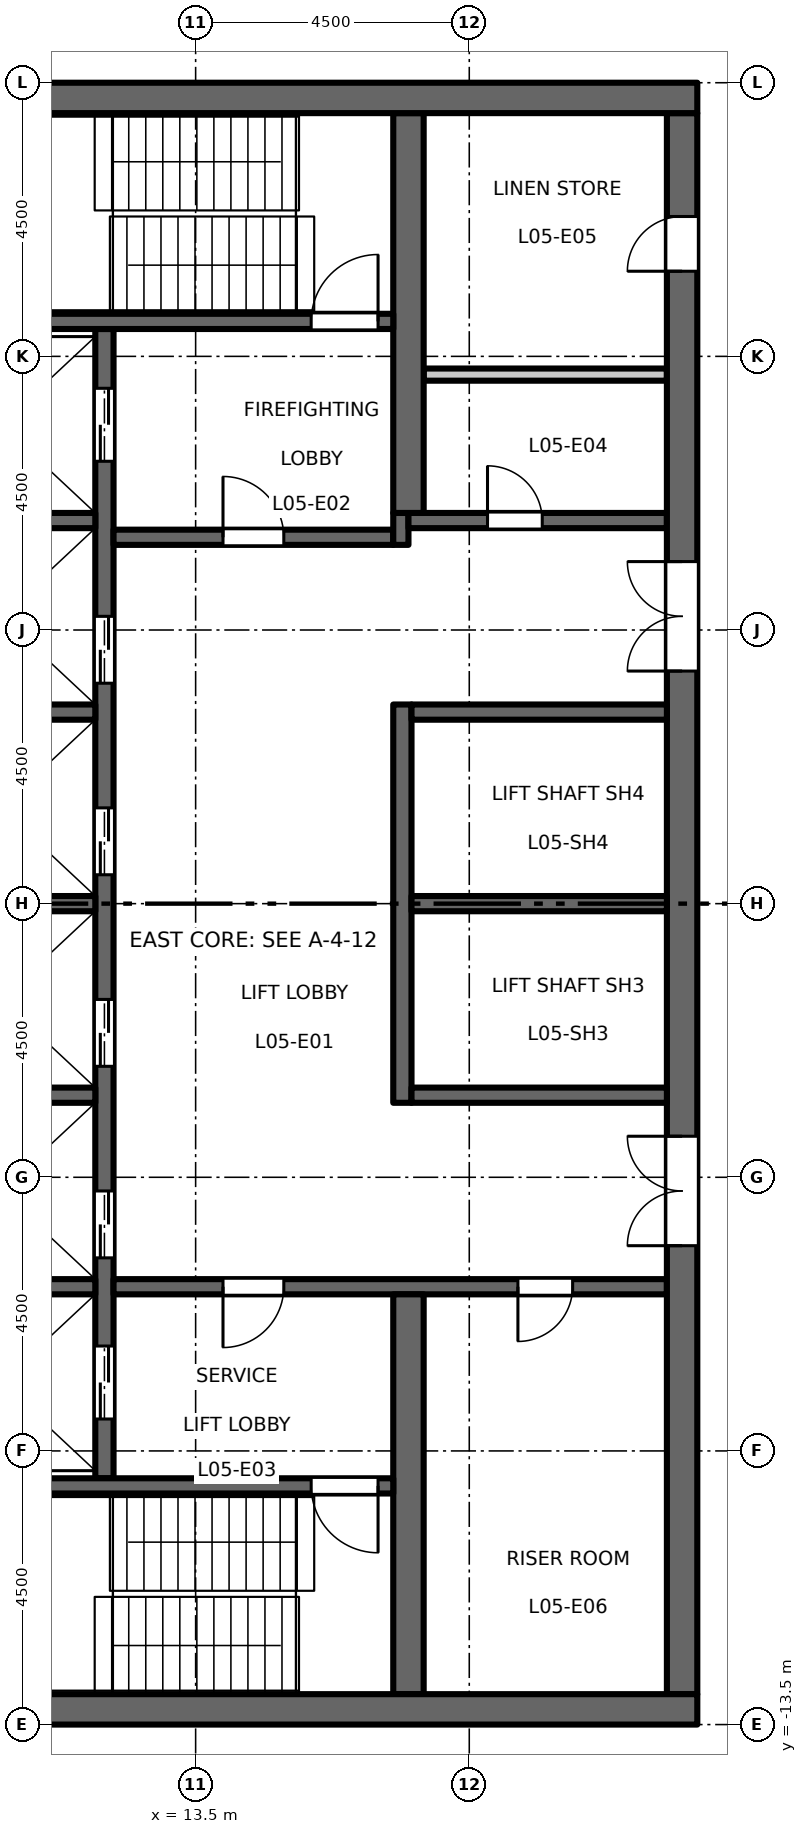
"""IFC4 building model, lengths in metres.
Left out: names, types, materials, properties, quantities, classifications, styles, units other than length and angle.
Written with IfcOpenShell. Run it as: python <this file> out.ifc"""

import sys

from ifc_helpers import new_model, si_unit, direction, frame, frame_2d, origin, place, context, subcontext, project, spatial, rectangle, extrude, element, fill, save


model = new_model("IFC4")
c1 = context("Model", 3, precision=1e-05, world=origin(), true_north=direction((0.0, 1.0)))
c2 = subcontext(c1, "Body", "Model", "MODEL_VIEW")
j1 = project(units=[si_unit("LENGTHUNIT", "METRE"), si_unit("PLANEANGLEUNIT", "RADIAN")], contexts=[c1])
p1 = place(None, origin())
s1 = spatial("IfcSite", under=j1, at=p1, CompositionType="ELEMENT")
p2 = place(p1, origin())
s2 = spatial("IfcBuilding", under=s1, at=p2, CompositionType="ELEMENT")
p3 = place(p2, frame((0.0, 0.0, 26.7)))
s3 = spatial("IfcBuildingStorey", under=s2, at=p3, CompositionType="ELEMENT", Elevation=26.7)
p4 = place(p3, frame((12.0, -9.45, 0.0), z_axis=(0.0, 0.0, 1.0), x_axis=(0.0, 1.0, 0.0)))
e1 = element("IfcWall", 1, at=p4, inside=s3, PredefinedType="SHEAR", context=c2, shape_type="SweptSolid", body=[
    extrude(rectangle(XDim=18.9, YDim=0.3, at=frame_2d((9.45, 0.0))), origin(), (0.0, 0.0, 1.0), 4.35),
])
p5 = place(p4, frame((3.625, 0.0, 0.0)))
e2 = element("IfcOpeningElement", 2, at=p5, cuts=e1, PredefinedType="OPENING", context=c2, shape_type="SweptSolid", body=[
    extrude(rectangle(XDim=1.1, YDim=2.1, at=frame_2d((0.55, 1.05))), frame((0.0, 0.16, 0.0), z_axis=(0.0, -1.0, 0.0), x_axis=(1.0, 0.0, 0.0)), (0.0, 0.0, 1.0), 0.32),
])
p6 = place(p4, frame((6.775, 0.0, 0.0)))
e3 = element("IfcOpeningElement", 3, at=p6, cuts=e1, PredefinedType="OPENING", context=c2, shape_type="SweptSolid", body=[
    extrude(rectangle(XDim=1.1, YDim=2.1, at=frame_2d((0.55, 1.05))), frame((0.0, 0.16, 0.0), z_axis=(0.0, -1.0, 0.0), x_axis=(1.0, 0.0, 0.0)), (0.0, 0.0, 1.0), 0.32),
])
p7 = place(p4, frame((9.925, 0.0, 0.0)))
e4 = element("IfcOpeningElement", 4, at=p7, cuts=e1, PredefinedType="OPENING", context=c2, shape_type="SweptSolid", body=[
    extrude(rectangle(XDim=1.1, YDim=2.1, at=frame_2d((0.55, 1.05))), frame((0.0, 0.16, 0.0), z_axis=(0.0, -1.0, 0.0), x_axis=(1.0, 0.0, 0.0)), (0.0, 0.0, 1.0), 0.32),
])
p8 = place(p4, frame((13.075, 0.0, 0.0)))
e5 = element("IfcOpeningElement", 5, at=p8, cuts=e1, PredefinedType="OPENING", context=c2, shape_type="SweptSolid", body=[
    extrude(rectangle(XDim=1.1, YDim=2.1, at=frame_2d((0.55, 1.05))), frame((0.0, 0.16, 0.0), z_axis=(0.0, -1.0, 0.0), x_axis=(1.0, 0.0, 0.0)), (0.0, 0.0, 1.0), 0.32),
])
p9 = place(p4, frame((16.725, 0.0, 0.0)))
e6 = element("IfcOpeningElement", 6, at=p9, cuts=e1, PredefinedType="OPENING", context=c2, shape_type="SweptSolid", body=[
    extrude(rectangle(XDim=1.2, YDim=2.1, at=frame_2d((0.6, 1.05))), frame((0.0, 0.16, 0.0), z_axis=(0.0, -1.0, 0.0), x_axis=(1.0, 0.0, 0.0)), (0.0, 0.0, 1.0), 0.32),
])
p10 = place(p4, frame((0.975, 0.0, 0.0)))
e7 = element("IfcOpeningElement", 7, at=p10, cuts=e1, PredefinedType="OPENING", context=c2, shape_type="SweptSolid", body=[
    extrude(rectangle(XDim=1.2, YDim=2.1, at=frame_2d((0.6, 1.05))), frame((0.0, 0.16, 0.0), z_axis=(0.0, -1.0, 0.0), x_axis=(1.0, 0.0, 0.0)), (0.0, 0.0, 1.0), 0.32),
])
p11 = place(p3, frame((12.15, 6.025, 0.0), z_axis=(0.0, 0.0, 1.0), x_axis=(1.0, 0.0, 0.0)))
e8 = element("IfcWall", 8, at=p11, inside=s3, PredefinedType="SHEAR", context=c2, shape_type="SweptSolid", body=[
    extrude(rectangle(XDim=4.6, YDim=0.25, at=frame_2d((2.3, 0.0))), origin(), (0.0, 0.0, 1.0), 4.35),
])
p12 = place(p11, frame((1.8, 0.0, 0.0)))
e9 = element("IfcOpeningElement", 9, at=p12, cuts=e8, PredefinedType="OPENING", context=c2, shape_type="SweptSolid", body=[
    extrude(rectangle(XDim=1.0, YDim=2.1, at=frame_2d((0.5, 1.05))), frame((0.0, 0.135, 0.0), z_axis=(0.0, -1.0, 0.0), x_axis=(1.0, 0.0, 0.0)), (0.0, 0.0, 1.0), 0.27),
])
p13 = place(p3, frame((16.875, 5.9, 0.0), z_axis=(0.0, 0.0, 1.0), x_axis=(0.0, 1.0, 0.0)))
e10 = element("IfcWall", 10, at=p13, inside=s3, PredefinedType="SHEAR", context=c2, shape_type="SweptSolid", body=[
    extrude(rectangle(XDim=0.525, YDim=0.25, at=frame_2d((0.263, 0.0))), origin(), (0.0, 0.0, 1.0), 4.35),
])
p14 = place(p3, frame((17.0, 6.3, 0.0), z_axis=(0.0, 0.0, 1.0), x_axis=(1.0, 0.0, 0.0)))
e11 = element("IfcWall", 11, at=p14, inside=s3, PredefinedType="SHEAR", context=c2, shape_type="SweptSolid", body=[
    extrude(rectangle(XDim=4.25, YDim=0.25, at=frame_2d((2.125, 0.0))), origin(), (0.0, 0.0, 1.0), 4.35),
])
p15 = place(p14, frame((1.3, 0.0, 0.0)))
e12 = element("IfcOpeningElement", 12, at=p15, cuts=e11, PredefinedType="OPENING", context=c2, shape_type="SweptSolid", body=[
    extrude(rectangle(XDim=0.9, YDim=2.1, at=frame_2d((0.45, 1.05))), frame((0.0, 0.135, 0.0), z_axis=(0.0, -1.0, 0.0), x_axis=(1.0, 0.0, 0.0)), (0.0, 0.0, 1.0), 0.27),
])
p16 = place(p3, frame((12.15, -6.3, 0.0), z_axis=(0.0, 0.0, 1.0), x_axis=(1.0, 0.0, 0.0)))
e13 = element("IfcWall", 13, at=p16, inside=s3, PredefinedType="SHEAR", context=c2, shape_type="SweptSolid", body=[
    extrude(rectangle(XDim=9.1, YDim=0.25, at=frame_2d((4.55, 0.0))), origin(), (0.0, 0.0, 1.0), 4.35),
])
p17 = place(p16, frame((1.8, 0.0, 0.0)))
e14 = element("IfcOpeningElement", 14, at=p17, cuts=e13, PredefinedType="OPENING", context=c2, shape_type="SweptSolid", body=[
    extrude(rectangle(XDim=1.0, YDim=2.1, at=frame_2d((0.5, 1.05))), frame((0.0, 0.135, 0.0), z_axis=(0.0, -1.0, 0.0), x_axis=(1.0, 0.0, 0.0)), (0.0, 0.0, 1.0), 0.27),
])
p18 = place(p16, frame((6.65, 0.0, 0.0)))
e15 = element("IfcOpeningElement", 15, at=p18, cuts=e13, PredefinedType="OPENING", context=c2, shape_type="SweptSolid", body=[
    extrude(rectangle(XDim=0.9, YDim=2.1, at=frame_2d((0.45, 1.05))), frame((0.0, 0.135, 0.0), z_axis=(0.0, -1.0, 0.0), x_axis=(1.0, 0.0, 0.0)), (0.0, 0.0, 1.0), 0.27),
])
p19 = place(p3, frame((21.5, -13.0, 0.0), z_axis=(0.0, 0.0, 1.0), x_axis=(0.0, 1.0, 0.0)))
e16 = element("IfcWall", 16, at=p19, inside=s3, PredefinedType="SHEAR", context=c2, shape_type="SweptSolid", body=[
    extrude(rectangle(XDim=26.0, YDim=0.5, at=frame_2d((13.0, 0.0))), origin(), (0.0, 0.0, 1.0), 4.35),
])
p20 = place(p19, frame((16.825, 0.0, 0.0)))
e17 = element("IfcOpeningElement", 17, at=p20, cuts=e16, PredefinedType="OPENING", context=c2, shape_type="SweptSolid", body=[
    extrude(rectangle(XDim=1.8, YDim=2.1, at=frame_2d((0.9, 1.05))), frame((0.0, 0.26, 0.0), z_axis=(0.0, -1.0, 0.0), x_axis=(1.0, 0.0, 0.0)), (0.0, 0.0, 1.0), 0.52),
])
p21 = place(p19, frame((7.375, 0.0, 0.0)))
e18 = element("IfcOpeningElement", 18, at=p21, cuts=e16, PredefinedType="OPENING", context=c2, shape_type="SweptSolid", body=[
    extrude(rectangle(XDim=1.8, YDim=2.1, at=frame_2d((0.9, 1.05))), frame((0.0, 0.26, 0.0), z_axis=(0.0, -1.0, 0.0), x_axis=(1.0, 0.0, 0.0)), (0.0, 0.0, 1.0), 0.52),
])
p22 = place(p19, frame((23.4, 0.0, 0.0)))
e19 = element("IfcOpeningElement", 19, at=p22, cuts=e16, PredefinedType="OPENING", context=c2, shape_type="SweptSolid", body=[
    extrude(rectangle(XDim=0.9, YDim=2.1, at=frame_2d((0.45, 1.05))), frame((0.0, 0.26, 0.0), z_axis=(0.0, -1.0, 0.0), x_axis=(1.0, 0.0, 0.0)), (0.0, 0.0, 1.0), 0.52),
])
p23 = place(p3, frame((17.25, 8.7, 0.0), z_axis=(0.0, 0.0, 1.0), x_axis=(1.0, 0.0, 0.0)))
e20 = element("IfcWall", 20, at=p23, inside=s3, PredefinedType="PARTITIONING", context=c2, shape_type="SweptSolid", body=[
    extrude(rectangle(XDim=4.0, YDim=0.2, at=frame_2d((2.0, 0.0))), origin(), (0.0, 0.0, 1.0), 4.35),
])
p24 = place(p3, frame((16.9, -3.275, 0.0), z_axis=(0.0, 0.0, 1.0), x_axis=(0.0, 1.0, 0.0)))
e21 = element("IfcWall", 21, at=p24, inside=s3, PredefinedType="SHEAR", context=c2, shape_type="SweptSolid", body=[
    extrude(rectangle(XDim=6.55, YDim=0.3, at=frame_2d((3.275, 0.0))), origin(), (0.0, 0.0, 1.0), 4.35),
])
for number, where, z_axis, x_axis in (
    (22, (17.05, 0.0, 0.0), (0.0, 0.0, 1.0), (1.0, 0.0, 0.0)),
    (23, (17.05, 3.15, 0.0), (0.0, 0.0, 1.0), (1.0, 0.0, 0.0)),
    (24, (17.05, -3.15, 0.0), (0.0, 0.0, 1.0), (1.0, 0.0, 0.0)),
):
    element("IfcWall", number, at=place(p3, frame(where, z_axis=z_axis, x_axis=x_axis)), inside=s3, PredefinedType="SHEAR", context=c2, shape_type="SweptSolid", body=[
        extrude(rectangle(XDim=4.2, YDim=0.25, at=frame_2d((2.1, 0.0))), origin(), (0.0, 0.0, 1.0), 4.35),
    ])
for number, where, z_axis, x_axis in (
    (25, (17.0, 6.425, 0.0), (0.0, 0.0, 1.0), (0.0, 1.0, 0.0)),
    (26, (17.0, -13.0, 0.0), (0.0, 0.0, 1.0), (0.0, 1.0, 0.0)),
):
    element("IfcWall", number, at=place(p3, frame(where, z_axis=z_axis, x_axis=x_axis)), inside=s3, PredefinedType="SHEAR", context=c2, shape_type="SweptSolid", body=[
        extrude(rectangle(XDim=6.575, YDim=0.5, at=frame_2d((3.288, 0.0))), origin(), (0.0, 0.0, 1.0), 4.35),
    ])
for number, where, z_axis, x_axis in (
    (27, (8.75, 0.0, 0.0), (0.0, 0.0, 1.0), (1.0, 0.0, 0.0)),
    (28, (8.75, 3.15, 0.0), (0.0, 0.0, 1.0), (1.0, 0.0, 0.0)),
    (29, (8.75, 6.3, 0.0), (0.0, 0.0, 1.0), (1.0, 0.0, 0.0)),
    (30, (8.75, -3.15, 0.0), (0.0, 0.0, 1.0), (1.0, 0.0, 0.0)),
    (31, (8.75, -6.3, 0.0), (0.0, 0.0, 1.0), (1.0, 0.0, 0.0)),
):
    element("IfcWall", number, at=place(p3, frame(where, z_axis=z_axis, x_axis=x_axis)), inside=s3, PredefinedType="SHEAR", context=c2, shape_type="SweptSolid", body=[
        extrude(rectangle(XDim=3.1, YDim=0.25, at=frame_2d((1.55, 0.0))), origin(), (0.0, 0.0, 1.0), 4.35),
    ])
p25 = place(p3, frame((8.75, 9.575, 0.0), z_axis=(0.0, 0.0, 1.0), x_axis=(1.0, 0.0, 0.0)))
e32 = element("IfcWall", 32, at=p25, inside=s3, PredefinedType="SHEAR", context=c2, shape_type="SweptSolid", body=[
    extrude(rectangle(XDim=8.0, YDim=0.25, at=frame_2d((4.0, 0.0))), origin(), (0.0, 0.0, 1.0), 4.35),
])
p26 = place(p25, frame((6.65, 0.0, 0.0)))
e33 = element("IfcOpeningElement", 33, at=p26, cuts=e32, PredefinedType="OPENING", context=c2, shape_type="SweptSolid", body=[
    extrude(rectangle(XDim=1.1, YDim=2.1, at=frame_2d((0.55, 1.05))), frame((0.0, 0.135, 0.0), z_axis=(0.0, -1.0, 0.0), x_axis=(1.0, 0.0, 0.0)), (0.0, 0.0, 1.0), 0.27),
])
p27 = place(p3, frame((8.75, -9.575, 0.0), z_axis=(0.0, 0.0, 1.0), x_axis=(1.0, 0.0, 0.0)))
e34 = element("IfcWall", 34, at=p27, inside=s3, PredefinedType="SHEAR", context=c2, shape_type="SweptSolid", body=[
    extrude(rectangle(XDim=8.0, YDim=0.25, at=frame_2d((4.0, 0.0))), origin(), (0.0, 0.0, 1.0), 4.35),
])
p28 = place(p27, frame((6.65, 0.0, 0.0)))
e35 = element("IfcOpeningElement", 35, at=p28, cuts=e34, PredefinedType="OPENING", context=c2, shape_type="SweptSolid", body=[
    extrude(rectangle(XDim=1.1, YDim=2.1, at=frame_2d((0.55, 1.05))), frame((0.0, 0.135, 0.0), z_axis=(0.0, -1.0, 0.0), x_axis=(1.0, 0.0, 0.0)), (0.0, 0.0, 1.0), 0.27),
])
for number, where, z_axis, x_axis in (
    (36, (8.25, 13.25, 0.0), (0.0, 0.0, 1.0), (1.0, 0.0, 0.0)),
    (37, (8.25, -13.25, 0.0), (0.0, 0.0, 1.0), (1.0, 0.0, 0.0)),
):
    element("IfcWall", number, at=place(p3, frame(where, z_axis=z_axis, x_axis=x_axis)), inside=s3, PredefinedType="SHEAR", context=c2, shape_type="SweptSolid", body=[
        extrude(rectangle(XDim=13.5, YDim=0.5, at=frame_2d((6.75, 0.0))), origin(), (0.0, 0.0, 1.0), 4.35),
    ])
p29 = place(p12, origin())
e38 = element("IfcDoor", 38, at=p29, inside=s3, OperationType="SINGLE_SWING_RIGHT", PredefinedType="DOOR", context=c2, shape_type="SweptSolid", body=[
    extrude(rectangle(XDim=1.0, YDim=2.1, at=frame_2d((0.5, 1.05))), frame((0.0, 0.025, 0.0), z_axis=(0.0, -1.0, 0.0), x_axis=(1.0, 0.0, 0.0)), (0.0, 0.0, 1.0), 0.05),
])
fill(e9, e38)
p30 = place(p17, origin())
e39 = element("IfcDoor", 39, at=p30, inside=s3, OperationType="SINGLE_SWING_LEFT", PredefinedType="DOOR", context=c2, shape_type="SweptSolid", body=[
    extrude(rectangle(XDim=1.0, YDim=2.1, at=frame_2d((0.5, 1.05))), frame((0.0, 0.025, 0.0), z_axis=(0.0, -1.0, 0.0), x_axis=(1.0, 0.0, 0.0)), (0.0, 0.0, 1.0), 0.05),
])
fill(e14, e39)
p31 = place(p26, origin())
e40 = element("IfcDoor", 40, at=p31, inside=s3, OperationType="SINGLE_SWING_LEFT", PredefinedType="DOOR", context=c2, shape_type="SweptSolid", body=[
    extrude(rectangle(XDim=1.1, YDim=2.1, at=frame_2d((0.55, 1.05))), frame((0.0, 0.025, 0.0), z_axis=(0.0, -1.0, 0.0), x_axis=(1.0, 0.0, 0.0)), (0.0, 0.0, 1.0), 0.05),
])
fill(e33, e40)
p32 = place(p28, origin())
e41 = element("IfcDoor", 41, at=p32, inside=s3, OperationType="SINGLE_SWING_RIGHT", PredefinedType="DOOR", context=c2, shape_type="SweptSolid", body=[
    extrude(rectangle(XDim=1.1, YDim=2.1, at=frame_2d((0.55, 1.05))), frame((0.0, 0.025, 0.0), z_axis=(0.0, -1.0, 0.0), x_axis=(1.0, 0.0, 0.0)), (0.0, 0.0, 1.0), 0.05),
])
fill(e35, e41)
p33 = place(p20, origin())
e42 = element("IfcDoor", 42, at=p33, inside=s3, OperationType="DOUBLE_DOOR_DOUBLE_SWING", PredefinedType="DOOR", context=c2, shape_type="SweptSolid", body=[
    extrude(rectangle(XDim=1.8, YDim=2.1, at=frame_2d((0.9, 1.05))), frame((0.0, 0.025, 0.0), z_axis=(0.0, -1.0, 0.0), x_axis=(1.0, 0.0, 0.0)), (0.0, 0.0, 1.0), 0.05),
])
fill(e17, e42)
p34 = place(p21, origin())
e43 = element("IfcDoor", 43, at=p34, inside=s3, OperationType="DOUBLE_DOOR_DOUBLE_SWING", PredefinedType="DOOR", context=c2, shape_type="SweptSolid", body=[
    extrude(rectangle(XDim=1.8, YDim=2.1, at=frame_2d((0.9, 1.05))), frame((0.0, 0.025, 0.0), z_axis=(0.0, -1.0, 0.0), x_axis=(1.0, 0.0, 0.0)), (0.0, 0.0, 1.0), 0.05),
])
fill(e18, e43)
p35 = place(p5, origin())
e44 = element("IfcDoor", 44, at=p35, inside=s3, OperationType="DOUBLE_DOOR_SLIDING", PredefinedType="DOOR", context=c2, shape_type="SweptSolid", body=[
    extrude(rectangle(XDim=1.1, YDim=2.1, at=frame_2d((0.55, 1.05))), frame((0.0, 0.025, 0.0), z_axis=(0.0, -1.0, 0.0), x_axis=(1.0, 0.0, 0.0)), (0.0, 0.0, 1.0), 0.05),
])
fill(e2, e44)
p36 = place(p6, origin())
e45 = element("IfcDoor", 45, at=p36, inside=s3, OperationType="DOUBLE_DOOR_SLIDING", PredefinedType="DOOR", context=c2, shape_type="SweptSolid", body=[
    extrude(rectangle(XDim=1.1, YDim=2.1, at=frame_2d((0.55, 1.05))), frame((0.0, 0.025, 0.0), z_axis=(0.0, -1.0, 0.0), x_axis=(1.0, 0.0, 0.0)), (0.0, 0.0, 1.0), 0.05),
])
fill(e3, e45)
p37 = place(p7, origin())
e46 = element("IfcDoor", 46, at=p37, inside=s3, OperationType="DOUBLE_DOOR_SLIDING", PredefinedType="DOOR", context=c2, shape_type="SweptSolid", body=[
    extrude(rectangle(XDim=1.1, YDim=2.1, at=frame_2d((0.55, 1.05))), frame((0.0, 0.025, 0.0), z_axis=(0.0, -1.0, 0.0), x_axis=(1.0, 0.0, 0.0)), (0.0, 0.0, 1.0), 0.05),
])
fill(e4, e46)
p38 = place(p8, origin())
e47 = element("IfcDoor", 47, at=p38, inside=s3, OperationType="DOUBLE_DOOR_SLIDING", PredefinedType="DOOR", context=c2, shape_type="SweptSolid", body=[
    extrude(rectangle(XDim=1.1, YDim=2.1, at=frame_2d((0.55, 1.05))), frame((0.0, 0.025, 0.0), z_axis=(0.0, -1.0, 0.0), x_axis=(1.0, 0.0, 0.0)), (0.0, 0.0, 1.0), 0.05),
])
fill(e5, e47)
p39 = place(p9, origin())
e48 = element("IfcDoor", 48, at=p39, inside=s3, OperationType="DOUBLE_DOOR_SLIDING", PredefinedType="DOOR", context=c2, shape_type="SweptSolid", body=[
    extrude(rectangle(XDim=1.2, YDim=2.1, at=frame_2d((0.6, 1.05))), frame((0.0, 0.025, 0.0), z_axis=(0.0, -1.0, 0.0), x_axis=(1.0, 0.0, 0.0)), (0.0, 0.0, 1.0), 0.05),
])
fill(e6, e48)
p40 = place(p10, origin())
e49 = element("IfcDoor", 49, at=p40, inside=s3, OperationType="DOUBLE_DOOR_SLIDING", PredefinedType="DOOR", context=c2, shape_type="SweptSolid", body=[
    extrude(rectangle(XDim=1.2, YDim=2.1, at=frame_2d((0.6, 1.05))), frame((0.0, 0.025, 0.0), z_axis=(0.0, -1.0, 0.0), x_axis=(1.0, 0.0, 0.0)), (0.0, 0.0, 1.0), 0.05),
])
fill(e7, e49)
p41 = place(p15, origin())
e50 = element("IfcDoor", 50, at=p41, inside=s3, OperationType="SINGLE_SWING_RIGHT", PredefinedType="DOOR", context=c2, shape_type="SweptSolid", body=[
    extrude(rectangle(XDim=0.9, YDim=2.1, at=frame_2d((0.45, 1.05))), frame((0.0, 0.025, 0.0), z_axis=(0.0, -1.0, 0.0), x_axis=(1.0, 0.0, 0.0)), (0.0, 0.0, 1.0), 0.05),
])
fill(e12, e50)
p42 = place(p22, origin())
e51 = element("IfcDoor", 51, at=p42, inside=s3, OperationType="SINGLE_SWING_RIGHT", PredefinedType="DOOR", context=c2, shape_type="SweptSolid", body=[
    extrude(rectangle(XDim=0.9, YDim=2.1, at=frame_2d((0.45, 1.05))), frame((0.0, 0.025, 0.0), z_axis=(0.0, -1.0, 0.0), x_axis=(1.0, 0.0, 0.0)), (0.0, 0.0, 1.0), 0.05),
])
fill(e19, e51)
p43 = place(p18, origin())
e52 = element("IfcDoor", 52, at=p43, inside=s3, OperationType="SINGLE_SWING_LEFT", PredefinedType="DOOR", context=c2, shape_type="SweptSolid", body=[
    extrude(rectangle(XDim=0.9, YDim=2.1, at=frame_2d((0.45, 1.05))), frame((0.0, 0.025, 0.0), z_axis=(0.0, -1.0, 0.0), x_axis=(1.0, 0.0, 0.0)), (0.0, 0.0, 1.0), 0.05),
])
fill(e15, e52)
save(model, sys.argv[1])
